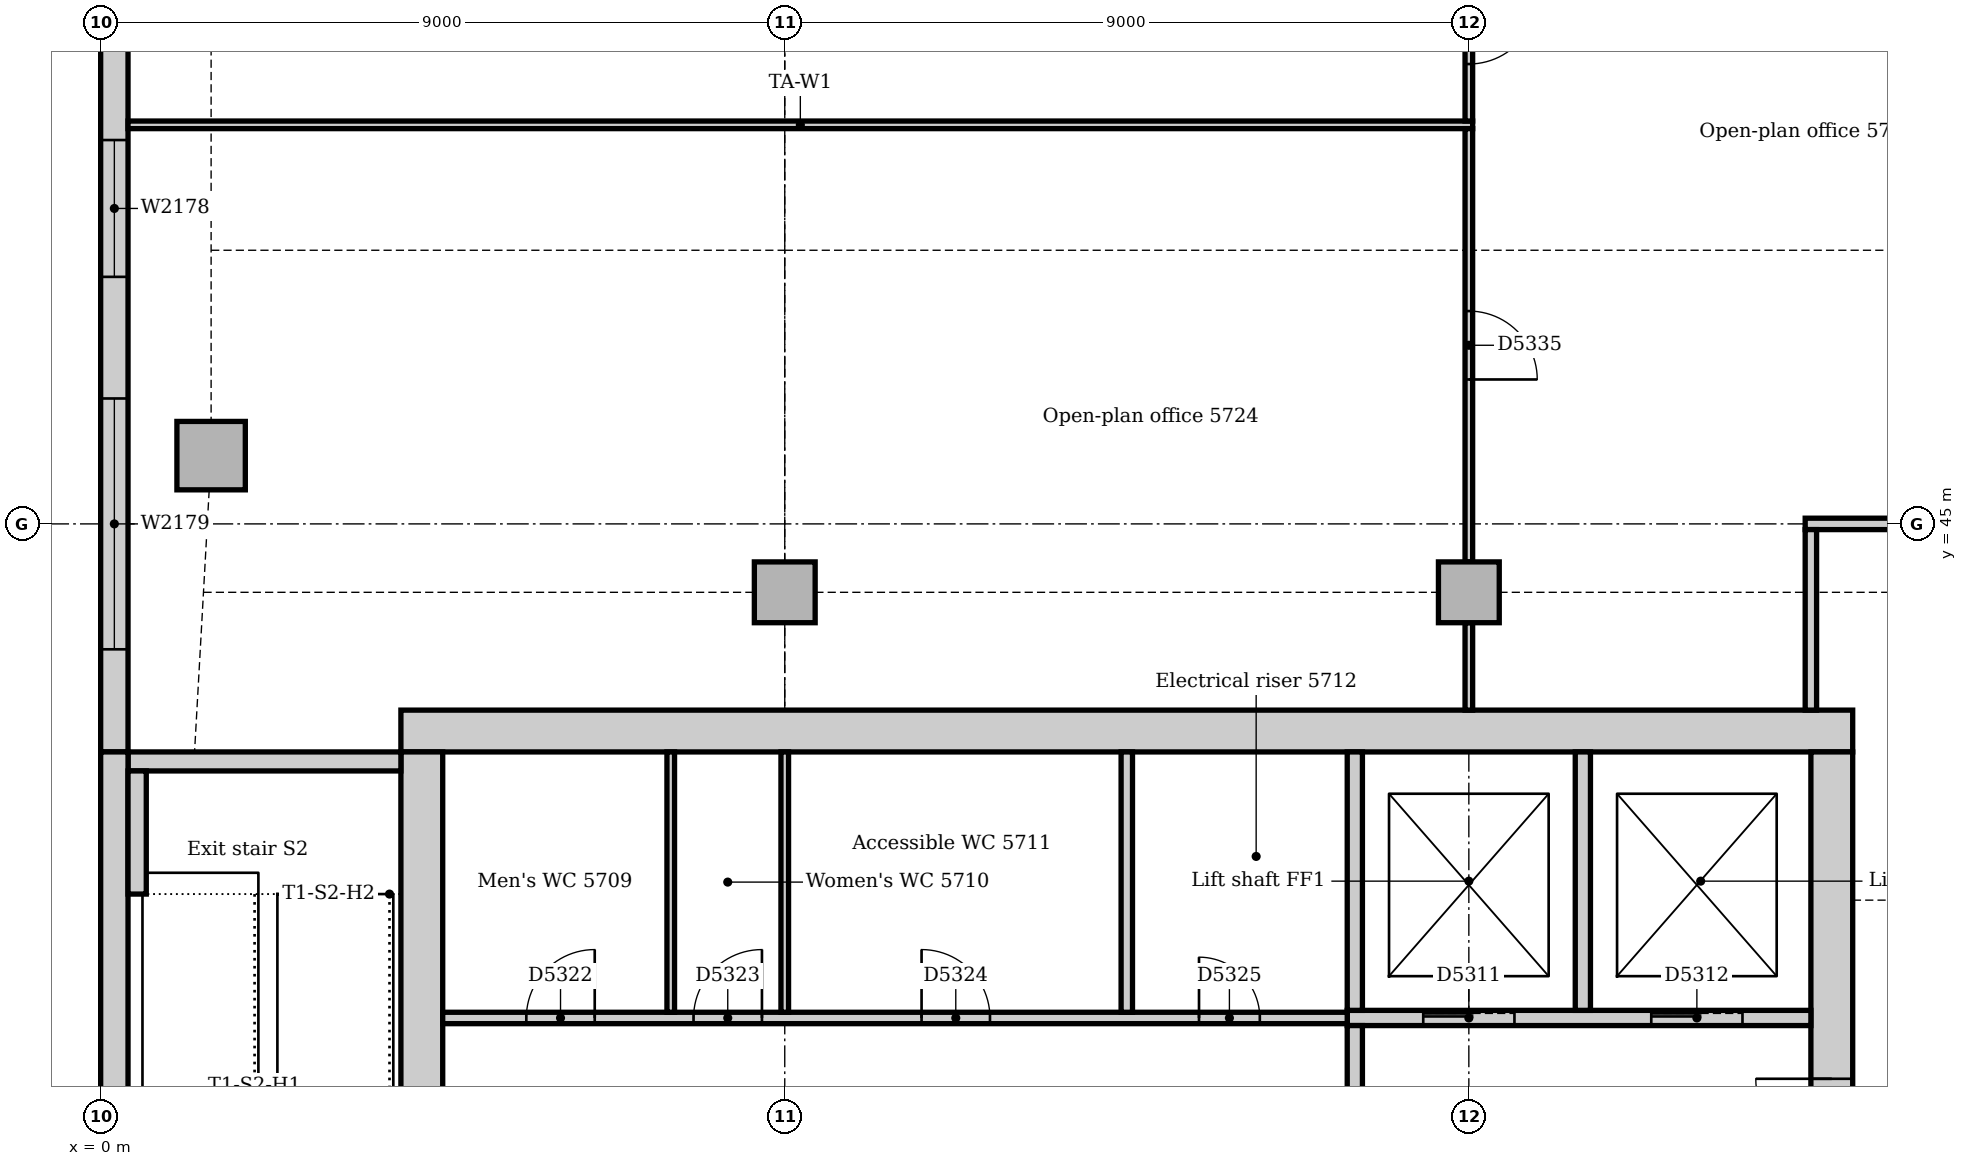
"""IFC4 building model, lengths in metres.
Left out: names, types, materials, properties, quantities, classifications, styles, units other than length and angle.
Written with IfcOpenShell. Run it as: python <this file> out.ifc"""

import sys

from ifc_helpers import new_model, si_unit, direction, frame, frame_2d, origin, origin_2d, place, context, subcontext, project, spatial, rectangle, extrude, element, fill, save


model = new_model("IFC4")
c1 = context("Model", 3, precision=1e-05, world=origin(), true_north=direction((0.0, 1.0)))
c2 = subcontext(c1, "Body", "Model", "MODEL_VIEW")
j1 = project(units=[si_unit("LENGTHUNIT", "METRE"), si_unit("PLANEANGLEUNIT", "RADIAN")], contexts=[c1])
p1 = place(None, origin())
s1 = spatial("IfcSite", under=j1, at=p1, CompositionType="ELEMENT")
p2 = place(p1, origin())
s2 = spatial("IfcBuilding", under=s1, at=p2, CompositionType="ELEMENT")
p3 = place(p2, frame((0.0, 0.0, 238.0)))
s3 = spatial("IfcBuildingStorey", under=s2, at=p3, CompositionType="ELEMENT", Elevation=238.0)
p4 = place(p3, frame((23.05, 42.275, 0.0), z_axis=(0.0, 0.0, 1.0), x_axis=(-1.0, 0.0, 0.0)))
e1 = element("IfcWall", 1, at=p4, inside=s3, PredefinedType="SOLIDWALL", context=c2, shape_type="SweptSolid", body=[
    extrude(rectangle(XDim=19.1, YDim=0.55, at=frame_2d((9.55, 0.0))), origin(), (0.0, 0.0, 1.0), 4.0),
])
p5 = place(p3, frame((22.775, 31.5, 0.0), z_axis=(0.0, 0.0, 1.0), x_axis=(0.0, 1.0, 0.0)))
e2 = element("IfcWall", 2, at=p5, inside=s3, PredefinedType="SOLIDWALL", context=c2, shape_type="SweptSolid", body=[
    extrude(rectangle(XDim=10.5, YDim=0.55, at=frame_2d((5.25, 0.0))), origin(), (0.0, 0.0, 1.0), 4.0),
])
p6 = place(p5, frame((3.15, 0.0, 0.0)))
e3 = element("IfcOpeningElement", 3, at=p6, cuts=e2, PredefinedType="OPENING", context=c2, shape_type="SweptSolid", body=[
    extrude(rectangle(XDim=1.0, YDim=2.1, at=frame_2d((0.5, 1.05))), frame((0.0, 0.285, 0.0), z_axis=(0.0, -1.0, 0.0), x_axis=(1.0, 0.0, 0.0)), (0.0, 0.0, 1.0), 0.57),
])
p7 = place(p5, frame((5.2, 0.0, 0.0)))
e4 = element("IfcOpeningElement", 4, at=p7, cuts=e2, PredefinedType="OPENING", context=c2, shape_type="SweptSolid", body=[
    extrude(rectangle(XDim=1.0, YDim=2.1, at=frame_2d((0.5, 1.05))), frame((0.0, 0.285, 0.0), z_axis=(0.0, -1.0, 0.0), x_axis=(1.0, 0.0, 0.0)), (0.0, 0.0, 1.0), 0.57),
])
p8 = place(p3, frame((4.225, 42.0, 0.0), z_axis=(0.0, 0.0, 1.0), x_axis=(0.0, -1.0, 0.0)))
e5 = element("IfcWall", 5, at=p8, inside=s3, PredefinedType="SOLIDWALL", context=c2, shape_type="SweptSolid", body=[
    extrude(rectangle(XDim=10.5, YDim=0.55, at=frame_2d((5.25, 0.0))), origin(), (0.0, 0.0, 1.0), 4.0),
])
p9 = place(p8, frame((5.3, 0.0, 0.0)))
e6 = element("IfcOpeningElement", 6, at=p9, cuts=e5, PredefinedType="OPENING", context=c2, shape_type="SweptSolid", body=[
    extrude(rectangle(XDim=1.0, YDim=2.1, at=frame_2d((0.5, 1.05))), frame((0.0, 0.285, 0.0), z_axis=(0.0, -1.0, 0.0), x_axis=(1.0, 0.0, 0.0)), (0.0, 0.0, 1.0), 0.57),
])
p10 = place(p3, frame((3.95, 41.875, 0.0), z_axis=(0.0, 0.0, 1.0), x_axis=(-1.0, 0.0, 0.0)))
e7 = element("IfcWall", 7, at=p10, inside=s3, PredefinedType="SOLIDWALL", context=c2, shape_type="SweptSolid", body=[
    extrude(rectangle(XDim=3.59, YDim=0.25, at=frame_2d((1.795, 0.0))), origin(), (0.0, 0.0, 1.0), 4.0),
])
p11 = place(p3, frame((1.453, 45.898, 0.0), z_axis=(0.0, 0.0, 1.0), x_axis=(1.0, 0.0, 0.0)))
e8 = element("IfcColumn", 8, at=p11, inside=s3, PredefinedType="COLUMN", context=c2, shape_type="SweptSolid", body=[
    extrude(rectangle(XDim=0.9, YDim=0.9, at=origin_2d()), origin(), (0.0, 0.0, 1.0), 3.7),
])
for number, where, z_axis, x_axis in (
    (9, (9.0, 44.1, 0.0), (0.0, 0.0, 1.0), (1.0, 0.0, 0.0)),
    (10, (18.0, 44.1, 0.0), (0.0, 0.0, 1.0), (1.0, 0.0, 0.0)),
):
    element("IfcColumn", number, at=place(p3, frame(where, z_axis=z_axis, x_axis=x_axis)), inside=s3, PredefinedType="COLUMN", context=c2, shape_type="SweptSolid", body=[
        extrude(rectangle(XDim=0.8, YDim=0.8, at=origin_2d()), origin(), (0.0, 0.0, 1.0), 3.7),
    ])
p12 = place(p3, frame((0.18, 54.257, 0.0), z_axis=(0.0, 0.0, 1.0), x_axis=(0.0, -1.0, 0.0)))
e11 = element("IfcWall", 11, at=p12, inside=s3, PredefinedType="STANDARD", context=c2, shape_type="SweptSolid", body=[
    extrude(rectangle(XDim=12.257, YDim=0.36, at=frame_2d((6.129, 0.0))), origin(), (0.0, 0.0, 1.0), 3.7),
])
p13 = place(p12, frame((4.207, 0.0, 0.9)))
e12 = element("IfcOpeningElement", 12, at=p13, cuts=e11, PredefinedType="OPENING", context=c2, shape_type="SweptSolid", body=[
    extrude(rectangle(XDim=1.8, YDim=1.6, at=frame_2d((0.9, 0.8))), frame((0.0, 0.19, 0.0), z_axis=(0.0, -1.0, 0.0), x_axis=(1.0, 0.0, 0.0)), (0.0, 0.0, 1.0), 0.38),
])
p14 = place(p12, frame((7.607, 0.0, 0.9)))
e13 = element("IfcOpeningElement", 13, at=p14, cuts=e11, PredefinedType="OPENING", context=c2, shape_type="SweptSolid", body=[
    extrude(rectangle(XDim=3.3, YDim=1.6, at=frame_2d((1.65, 0.8))), frame((0.0, 0.19, 0.0), z_axis=(0.0, -1.0, 0.0), x_axis=(1.0, 0.0, 0.0)), (0.0, 0.0, 1.0), 0.38),
])
p15 = place(p3, frame((0.18, 42.0, 0.0), z_axis=(0.0, 0.0, 1.0), x_axis=(0.0, -1.0, 0.0)))
e14 = element("IfcWall", 14, at=p15, inside=s3, PredefinedType="STANDARD", context=c2, shape_type="SweptSolid", body=[
    extrude(rectangle(XDim=6.75, YDim=0.36, at=frame_2d((3.375, 0.0))), origin(), (0.0, 0.0, 1.0), 3.7),
])
p16 = place(p3, frame((0.48, 40.13, 0.0), z_axis=(0.0, 0.0, 1.0), x_axis=(0.0, 1.0, 0.0)))
e15 = element("IfcWall", 15, at=p16, inside=s3, PredefinedType="STANDARD", context=c2, shape_type="SweptSolid", body=[
    extrude(rectangle(XDim=1.62, YDim=0.24, at=frame_2d((0.81, 0.0))), origin(), (0.0, 0.0, 1.0), 4.0),
])
p17 = place(p3, frame((16.4, 38.5, 0.0), z_axis=(0.0, 0.0, 1.0), x_axis=(1.0, 0.0, 0.0)))
e16 = element("IfcWall", 16, at=p17, inside=s3, PredefinedType="PARTITIONING", context=c2, shape_type="SweptSolid", body=[
    extrude(rectangle(XDim=6.1, YDim=0.2, at=frame_2d((3.05, 0.0))), origin(), (0.0, 0.0, 1.0), 3.7),
])
p18 = place(p17, frame((1.0, 0.0, 0.0)))
e17 = element("IfcOpeningElement", 17, at=p18, cuts=e16, PredefinedType="OPENING", context=c2, shape_type="SweptSolid", body=[
    extrude(rectangle(XDim=1.2, YDim=2.1, at=frame_2d((0.6, 1.05))), frame((0.0, 0.11, 0.0), z_axis=(0.0, -1.0, 0.0), x_axis=(1.0, 0.0, 0.0)), (0.0, 0.0, 1.0), 0.22),
])
p19 = place(p17, frame((4.0, 0.0, 0.0)))
e18 = element("IfcOpeningElement", 18, at=p19, cuts=e16, PredefinedType="OPENING", context=c2, shape_type="SweptSolid", body=[
    extrude(rectangle(XDim=1.2, YDim=2.1, at=frame_2d((0.6, 1.05))), frame((0.0, 0.11, 0.0), z_axis=(0.0, -1.0, 0.0), x_axis=(1.0, 0.0, 0.0)), (0.0, 0.0, 1.0), 0.22),
])
p20 = place(p3, frame((16.5, 35.85, 0.0), z_axis=(0.0, 0.0, 1.0), x_axis=(0.0, 1.0, 0.0)))
e19 = element("IfcWall", 19, at=p20, inside=s3, PredefinedType="PARTITIONING", context=c2, shape_type="SweptSolid", body=[
    extrude(rectangle(XDim=2.55, YDim=0.2, at=frame_2d((1.275, 0.0))), origin(), (0.0, 0.0, 1.0), 3.7),
])
for number, where, z_axis, x_axis in (
    (20, (16.5, 38.6, 0.0), (0.0, 0.0, 1.0), (0.0, 1.0, 0.0)),
    (21, (19.5, 38.6, 0.0), (0.0, 0.0, 1.0), (0.0, 1.0, 0.0)),
):
    element("IfcWall", number, at=place(p3, frame(where, z_axis=z_axis, x_axis=x_axis)), inside=s3, PredefinedType="PARTITIONING", context=c2, shape_type="SweptSolid", body=[
        extrude(rectangle(XDim=3.4, YDim=0.2, at=frame_2d((1.7, 0.0))), origin(), (0.0, 0.0, 1.0), 3.7),
    ])
p21 = place(p3, frame((4.5, 38.5, 0.0), z_axis=(0.0, 0.0, 1.0), x_axis=(1.0, 0.0, 0.0)))
e22 = element("IfcWall", 22, at=p21, inside=s3, PredefinedType="PARTITIONING", context=c2, shape_type="SweptSolid", body=[
    extrude(rectangle(XDim=11.9, YDim=0.15, at=frame_2d((5.95, 0.0))), origin(), (0.0, 0.0, 1.0), 3.7),
])
p22 = place(p21, frame((1.1, 0.0, 0.0)))
e23 = element("IfcOpeningElement", 23, at=p22, cuts=e22, PredefinedType="OPENING", context=c2, shape_type="SweptSolid", body=[
    extrude(rectangle(XDim=0.9, YDim=2.1, at=frame_2d((0.45, 1.05))), frame((0.0, 0.085, 0.0), z_axis=(0.0, -1.0, 0.0), x_axis=(1.0, 0.0, 0.0)), (0.0, 0.0, 1.0), 0.17),
])
p23 = place(p21, frame((3.3, 0.0, 0.0)))
e24 = element("IfcOpeningElement", 24, at=p23, cuts=e22, PredefinedType="OPENING", context=c2, shape_type="SweptSolid", body=[
    extrude(rectangle(XDim=0.9, YDim=2.1, at=frame_2d((0.45, 1.05))), frame((0.0, 0.085, 0.0), z_axis=(0.0, -1.0, 0.0), x_axis=(1.0, 0.0, 0.0)), (0.0, 0.0, 1.0), 0.17),
])
p24 = place(p21, frame((6.3, 0.0, 0.0)))
e25 = element("IfcOpeningElement", 25, at=p24, cuts=e22, PredefinedType="OPENING", context=c2, shape_type="SweptSolid", body=[
    extrude(rectangle(XDim=0.9, YDim=2.1, at=frame_2d((0.45, 1.05))), frame((0.0, 0.085, 0.0), z_axis=(0.0, -1.0, 0.0), x_axis=(1.0, 0.0, 0.0)), (0.0, 0.0, 1.0), 0.17),
])
p25 = place(p21, frame((9.95, 0.0, 0.0)))
e26 = element("IfcOpeningElement", 26, at=p25, cuts=e22, PredefinedType="OPENING", context=c2, shape_type="SweptSolid", body=[
    extrude(rectangle(XDim=0.8, YDim=2.1, at=frame_2d((0.4, 1.05))), frame((0.0, 0.085, 0.0), z_axis=(0.0, -1.0, 0.0), x_axis=(1.0, 0.0, 0.0)), (0.0, 0.0, 1.0), 0.17),
])
p26 = place(p3, frame((22.425, 45.0, 0.0), z_axis=(0.0, 0.0, 1.0), x_axis=(1.0, 0.0, 0.0)))
e27 = element("IfcWall", 27, at=p26, inside=s3, PredefinedType="PARTITIONING", context=c2, shape_type="SweptSolid", body=[
    extrude(rectangle(XDim=4.5, YDim=0.15, at=frame_2d((2.25, 0.0))), origin(), (0.0, 0.0, 1.0), 3.7),
])
p27 = place(p26, frame((1.75, 0.0, 0.0)))
e28 = element("IfcOpeningElement", 28, at=p27, cuts=e27, PredefinedType="OPENING", context=c2, shape_type="SweptSolid", body=[
    extrude(rectangle(XDim=1.0, YDim=2.1, at=frame_2d((0.5, 1.05))), frame((0.0, 0.085, 0.0), z_axis=(0.0, -1.0, 0.0), x_axis=(1.0, 0.0, 0.0)), (0.0, 0.0, 1.0), 0.17),
])
p28 = place(p3, frame((22.5, 42.55, 0.0), z_axis=(0.0, 0.0, 1.0), x_axis=(0.0, 1.0, 0.0)))
e29 = element("IfcWall", 29, at=p28, inside=s3, PredefinedType="PARTITIONING", context=c2, shape_type="SweptSolid", body=[
    extrude(rectangle(XDim=2.375, YDim=0.15, at=frame_2d((1.188, 0.0))), origin(), (0.0, 0.0, 1.0), 3.7),
])
p29 = place(p3, frame((13.5, 38.575, 0.0), z_axis=(0.0, 0.0, 1.0), x_axis=(0.0, 1.0, 0.0)))
e30 = element("IfcWall", 30, at=p29, inside=s3, PredefinedType="PARTITIONING", context=c2, shape_type="SweptSolid", body=[
    extrude(rectangle(XDim=3.425, YDim=0.15, at=frame_2d((1.712, 0.0))), origin(), (0.0, 0.0, 1.0), 3.7),
])
p30 = place(p3, frame((0.36, 50.25, 0.0), z_axis=(0.0, 0.0, 1.0), x_axis=(1.0, 0.0, 0.0)))
e31 = element("IfcWall", 31, at=p30, inside=s3, PredefinedType="PARTITIONING", context=c2, shape_type="SweptSolid", body=[
    extrude(rectangle(XDim=17.69, YDim=0.1, at=frame_2d((8.845, 0.0))), origin(), (0.0, 0.0, 1.0), 3.7),
])
p31 = place(p3, frame((18.0, 42.55, 0.0), z_axis=(0.0, 0.0, 1.0), x_axis=(0.0, 1.0, 0.0)))
e32 = element("IfcWall", 32, at=p31, inside=s3, PredefinedType="PARTITIONING", context=c2, shape_type="SweptSolid", body=[
    extrude(rectangle(XDim=1.15, YDim=0.1, at=frame_2d((0.575, 0.0))), origin(), (0.0, 0.0, 1.0), 3.502),
])
p32 = place(p3, frame((18.0, 50.3, 0.0), z_axis=(0.0, 0.0, 1.0), x_axis=(0.0, 1.0, 0.0)))
e33 = element("IfcWall", 33, at=p32, inside=s3, PredefinedType="PARTITIONING", context=c2, shape_type="SweptSolid", body=[
    extrude(rectangle(XDim=2.4, YDim=0.1, at=frame_2d((1.2, 0.0))), origin(), (0.0, 0.0, 1.0), 3.2),
])
p33 = place(p32, frame((0.75, 0.0, 0.0)))
e34 = element("IfcOpeningElement", 34, at=p33, cuts=e33, PredefinedType="OPENING", context=c2, shape_type="SweptSolid", body=[
    extrude(rectangle(XDim=0.9, YDim=2.1, at=frame_2d((0.45, 1.05))), frame((0.0, 0.06, 0.0), z_axis=(0.0, -1.0, 0.0), x_axis=(1.0, 0.0, 0.0)), (0.0, 0.0, 1.0), 0.12),
])
p34 = place(p3, frame((18.0, 44.5, 0.0), z_axis=(0.0, 0.0, 1.0), x_axis=(0.0, 1.0, 0.0)))
e35 = element("IfcWall", 35, at=p34, inside=s3, PredefinedType="PARTITIONING", context=c2, shape_type="SweptSolid", body=[
    extrude(rectangle(XDim=5.7, YDim=0.1, at=frame_2d((2.85, 0.0))), origin(), (0.0, 0.0, 1.0), 3.2),
])
p35 = place(p34, frame((2.4, 0.0, 0.0)))
e36 = element("IfcOpeningElement", 36, at=p35, cuts=e35, PredefinedType="OPENING", context=c2, shape_type="SweptSolid", body=[
    extrude(rectangle(XDim=0.9, YDim=2.1, at=frame_2d((0.45, 1.05))), frame((0.0, 0.06, 0.0), z_axis=(0.0, -1.0, 0.0), x_axis=(1.0, 0.0, 0.0)), (0.0, 0.0, 1.0), 0.12),
])
for number, where, z_axis, x_axis in (
    (37, (7.5, 38.575, 0.0), (0.0, 0.0, 1.0), (0.0, 1.0, 0.0)),
    (38, (9.0, 38.575, 0.0), (0.0, 0.0, 1.0), (0.0, 1.0, 0.0)),
):
    element("IfcWall", number, at=place(p3, frame(where, z_axis=z_axis, x_axis=x_axis)), inside=s3, PredefinedType="PARTITIONING", context=c2, shape_type="SweptSolid", body=[
        extrude(rectangle(XDim=3.425, YDim=0.1, at=frame_2d((1.712, 0.0))), origin(), (0.0, 0.0, 1.0), 3.7),
    ])
p36 = place(p13, origin())
e39 = element("IfcWindow", 39, at=p36, inside=s3, PartitioningType="SINGLE_PANEL", PredefinedType="WINDOW", context=c2, shape_type="SweptSolid", body=[
    extrude(rectangle(XDim=1.8, YDim=1.6, at=frame_2d((0.9, 0.8))), frame((0.0, 0.13, 0.0), z_axis=(0.0, -1.0, 0.0), x_axis=(1.0, 0.0, 0.0)), (0.0, 0.0, 1.0), 0.06),
])
fill(e12, e39)
p37 = place(p14, origin())
e40 = element("IfcWindow", 40, at=p37, inside=s3, PartitioningType="SINGLE_PANEL", PredefinedType="WINDOW", context=c2, shape_type="SweptSolid", body=[
    extrude(rectangle(XDim=3.3, YDim=1.6, at=frame_2d((1.65, 0.8))), frame((0.0, 0.13, 0.0), z_axis=(0.0, -1.0, 0.0), x_axis=(1.0, 0.0, 0.0)), (0.0, 0.0, 1.0), 0.06),
])
fill(e13, e40)
p38 = place(p18, origin())
e41 = element("IfcDoor", 41, at=p38, inside=s3, OperationType="SLIDING_TO_LEFT", PredefinedType="DOOR", context=c2, shape_type="SweptSolid", body=[
    extrude(rectangle(XDim=1.2, YDim=2.1, at=frame_2d((0.6, 1.05))), frame((0.0, 0.025, 0.0), z_axis=(0.0, -1.0, 0.0), x_axis=(1.0, 0.0, 0.0)), (0.0, 0.0, 1.0), 0.05),
])
fill(e17, e41)
p39 = place(p19, origin())
e42 = element("IfcDoor", 42, at=p39, inside=s3, OperationType="SLIDING_TO_LEFT", PredefinedType="DOOR", context=c2, shape_type="SweptSolid", body=[
    extrude(rectangle(XDim=1.2, YDim=2.1, at=frame_2d((0.6, 1.05))), frame((0.0, 0.025, 0.0), z_axis=(0.0, -1.0, 0.0), x_axis=(1.0, 0.0, 0.0)), (0.0, 0.0, 1.0), 0.05),
])
fill(e18, e42)
p40 = place(p7, origin())
e43 = element("IfcDoor", 43, at=p40, inside=s3, OperationType="SINGLE_SWING_RIGHT", PredefinedType="DOOR", context=c2, shape_type="SweptSolid", body=[
    extrude(rectangle(XDim=1.0, YDim=2.1, at=frame_2d((0.5, 1.05))), frame((0.0, 0.025, 0.0), z_axis=(0.0, -1.0, 0.0), x_axis=(1.0, 0.0, 0.0)), (0.0, 0.0, 1.0), 0.05),
])
fill(e4, e43)
p41 = place(p22, origin())
e44 = element("IfcDoor", 44, at=p41, inside=s3, OperationType="SINGLE_SWING_RIGHT", PredefinedType="DOOR", context=c2, shape_type="SweptSolid", body=[
    extrude(rectangle(XDim=0.9, YDim=2.1, at=frame_2d((0.45, 1.05))), frame((0.0, 0.025, 0.0), z_axis=(0.0, -1.0, 0.0), x_axis=(1.0, 0.0, 0.0)), (0.0, 0.0, 1.0), 0.05),
])
fill(e23, e44)
p42 = place(p23, origin())
e45 = element("IfcDoor", 45, at=p42, inside=s3, OperationType="SINGLE_SWING_RIGHT", PredefinedType="DOOR", context=c2, shape_type="SweptSolid", body=[
    extrude(rectangle(XDim=0.9, YDim=2.1, at=frame_2d((0.45, 1.05))), frame((0.0, 0.025, 0.0), z_axis=(0.0, -1.0, 0.0), x_axis=(1.0, 0.0, 0.0)), (0.0, 0.0, 1.0), 0.05),
])
fill(e24, e45)
p43 = place(p24, origin())
e46 = element("IfcDoor", 46, at=p43, inside=s3, OperationType="SINGLE_SWING_LEFT", PredefinedType="DOOR", context=c2, shape_type="SweptSolid", body=[
    extrude(rectangle(XDim=0.9, YDim=2.1, at=frame_2d((0.45, 1.05))), frame((0.0, 0.025, 0.0), z_axis=(0.0, -1.0, 0.0), x_axis=(1.0, 0.0, 0.0)), (0.0, 0.0, 1.0), 0.05),
])
fill(e25, e46)
p44 = place(p25, origin())
e47 = element("IfcDoor", 47, at=p44, inside=s3, OperationType="SINGLE_SWING_LEFT", PredefinedType="DOOR", context=c2, shape_type="SweptSolid", body=[
    extrude(rectangle(XDim=0.8, YDim=2.1, at=frame_2d((0.4, 1.05))), frame((0.0, 0.025, 0.0), z_axis=(0.0, -1.0, 0.0), x_axis=(1.0, 0.0, 0.0)), (0.0, 0.0, 1.0), 0.05),
])
fill(e26, e47)
p45 = place(p35, frame((0.9, 0.0, 0.0), z_axis=(0.0, 0.0, 1.0), x_axis=(-1.0, 0.0, 0.0)))
e48 = element("IfcDoor", 48, at=p45, inside=s3, OperationType="SINGLE_SWING_RIGHT", PredefinedType="DOOR", context=c2, shape_type="SweptSolid", body=[
    extrude(rectangle(XDim=0.9, YDim=2.1, at=frame_2d((0.45, 1.05))), frame((0.0, 0.025, 0.0), z_axis=(0.0, -1.0, 0.0), x_axis=(1.0, 0.0, 0.0)), (0.0, 0.0, 1.0), 0.05),
])
fill(e36, e48)
p46 = place(p33, frame((0.9, 0.0, 0.0), z_axis=(0.0, 0.0, 1.0), x_axis=(-1.0, 0.0, 0.0)))
e49 = element("IfcDoor", 49, at=p46, inside=s3, OperationType="SINGLE_SWING_LEFT", PredefinedType="DOOR", context=c2, shape_type="SweptSolid", body=[
    extrude(rectangle(XDim=0.9, YDim=2.1, at=frame_2d((0.45, 1.05))), frame((0.0, 0.025, 0.0), z_axis=(0.0, -1.0, 0.0), x_axis=(1.0, 0.0, 0.0)), (0.0, 0.0, 1.0), 0.05),
])
fill(e34, e49)
save(model, sys.argv[1])
